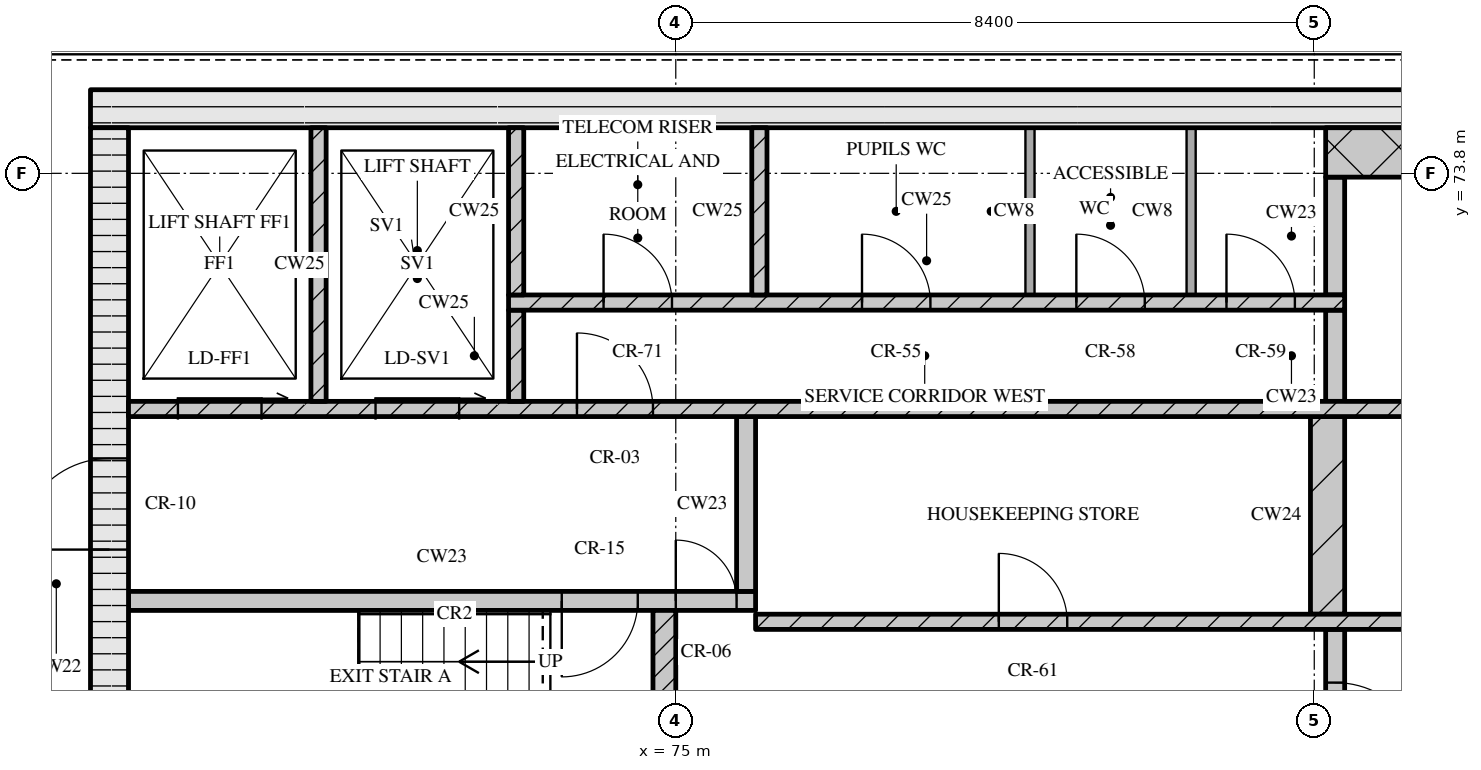
"""IFC4 building model, lengths in metres.
Left out: names, types, materials, properties, quantities, classifications, styles, units other than length and angle.
Written with IfcOpenShell. Run it as: python <this file> out.ifc"""

import sys

from ifc_helpers import new_model, si_unit, direction, frame, frame_2d, origin, place, context, subcontext, project, spatial, rectangle, extrude, element, fill, save


model = new_model("IFC4")
c1 = context("Model", 3, precision=1e-05, world=origin(), true_north=direction((0.0, 1.0)))
c2 = subcontext(c1, "Body", "Model", "MODEL_VIEW")
j1 = project(units=[si_unit("LENGTHUNIT", "METRE"), si_unit("PLANEANGLEUNIT", "RADIAN")], contexts=[c1])
p1 = place(None, origin())
s1 = spatial("IfcSite", under=j1, at=p1, CompositionType="ELEMENT")
p2 = place(p1, origin())
s2 = spatial("IfcBuilding", under=s1, at=p2, CompositionType="ELEMENT")
p3 = place(p2, frame((0.0, 0.0, 270.75)))
s3 = spatial("IfcBuildingStorey", under=s2, at=p3, CompositionType="ELEMENT", Elevation=270.75)
p4 = place(p3, frame((67.3, 74.65, 0.0), z_axis=(0.0, 0.0, 1.0), x_axis=(1.0, 0.0, 0.0)))
e1 = element("IfcWall", 1, at=p4, inside=s3, PredefinedType="SOLIDWALL", context=c2, shape_type="SweptSolid", body=[
    extrude(rectangle(XDim=40.6, YDim=0.5, at=frame_2d((20.3, 0.0))), origin(), (0.0, 0.0, 1.0), 3.32),
])
p5 = place(p3, frame((67.55, 62.4, 0.0), z_axis=(0.0, 0.0, 1.0), x_axis=(0.0, 1.0, 0.0)))
e2 = element("IfcWall", 2, at=p5, inside=s3, PredefinedType="SOLIDWALL", context=c2, shape_type="SweptSolid", body=[
    extrude(rectangle(XDim=12.0, YDim=0.5, at=frame_2d((6.0, 0.0))), origin(), (0.0, 0.0, 1.0), 3.32),
])
p6 = place(p5, frame((6.45, 0.0, 0.0)))
e3 = element("IfcOpeningElement", 3, at=p6, cuts=e2, PredefinedType="OPENING", context=c2, shape_type="SweptSolid", body=[
    extrude(rectangle(XDim=1.2, YDim=2.1, at=frame_2d((0.6, 1.05))), frame((0.0, 0.26, 0.0), z_axis=(0.0, -1.0, 0.0), x_axis=(1.0, 0.0, 0.0)), (0.0, 0.0, 1.0), 0.52),
])
p7 = place(p3, frame((74.85, 65.2, 0.0), z_axis=(0.0, 0.0, 1.0), x_axis=(0.0, 1.0, 0.0)))
e4 = element("IfcWall", 4, at=p7, inside=s3, PredefinedType="SOLIDWALL", context=c2, shape_type="SweptSolid", body=[
    extrude(rectangle(XDim=2.85, YDim=0.3, at=frame_2d((1.425, 0.0))), origin(), (0.0, 0.0, 1.0), 3.32),
])
p8 = place(p3, frame((83.675, 65.2, 0.0), z_axis=(0.0, 0.0, 1.0), x_axis=(0.0, 1.0, 0.0)))
e5 = element("IfcWall", 5, at=p8, inside=s3, PredefinedType="SOLIDWALL", context=c2, shape_type="SweptSolid", body=[
    extrude(rectangle(XDim=2.6, YDim=0.25, at=frame_2d((1.3, 0.0))), origin(), (0.0, 0.0, 1.0), 3.32),
])
p9 = place(p8, frame((0.7, 0.0, 0.0)))
e6 = element("IfcOpeningElement", 6, at=p9, cuts=e5, PredefinedType="OPENING", context=c2, shape_type="SweptSolid", body=[
    extrude(rectangle(XDim=1.2, YDim=2.1, at=frame_2d((0.6, 1.05))), frame((0.0, 0.135, 0.0), z_axis=(0.0, -1.0, 0.0), x_axis=(1.0, 0.0, 0.0)), (0.0, 0.0, 1.0), 0.27),
])
p10 = place(p3, frame((76.05, 67.9, 0.0), z_axis=(0.0, 0.0, 1.0), x_axis=(1.0, 0.0, 0.0)))
e7 = element("IfcWall", 7, at=p10, inside=s3, PredefinedType="SOLIDWALL", context=c2, shape_type="SweptSolid", body=[
    extrude(rectangle(XDim=23.1, YDim=0.2, at=frame_2d((11.55, 0.0))), origin(), (0.0, 0.0, 1.0), 3.32),
])
p11 = place(p10, frame((3.2, 0.0, 0.0)))
e8 = element("IfcOpeningElement", 8, at=p11, cuts=e7, PredefinedType="OPENING", context=c2, shape_type="SweptSolid", body=[
    extrude(rectangle(XDim=0.9, YDim=2.1, at=frame_2d((0.45, 1.05))), frame((0.0, 0.11, 0.0), z_axis=(0.0, -1.0, 0.0), x_axis=(1.0, 0.0, 0.0)), (0.0, 0.0, 1.0), 0.22),
])
p12 = place(p10, frame((9.7, 0.0, 0.0)))
e9 = element("IfcOpeningElement", 9, at=p12, cuts=e7, PredefinedType="OPENING", context=c2, shape_type="SweptSolid", body=[
    extrude(rectangle(XDim=0.9, YDim=2.1, at=frame_2d((0.45, 1.05))), frame((0.0, 0.11, 0.0), z_axis=(0.0, -1.0, 0.0), x_axis=(1.0, 0.0, 0.0)), (0.0, 0.0, 1.0), 0.22),
])
p13 = place(p10, frame((13.55, 0.0, 0.0)))
e10 = element("IfcOpeningElement", 10, at=p13, cuts=e7, PredefinedType="OPENING", context=c2, shape_type="SweptSolid", body=[
    extrude(rectangle(XDim=1.0, YDim=2.1, at=frame_2d((0.5, 1.05))), frame((0.0, 0.11, 0.0), z_axis=(0.0, -1.0, 0.0), x_axis=(1.0, 0.0, 0.0)), (0.0, 0.0, 1.0), 0.22),
])
p14 = place(p10, frame((16.2, 0.0, 0.0)))
e11 = element("IfcOpeningElement", 11, at=p14, cuts=e7, PredefinedType="OPENING", context=c2, shape_type="SweptSolid", body=[
    extrude(rectangle(XDim=1.1, YDim=2.1, at=frame_2d((0.55, 1.05))), frame((0.0, 0.11, 0.0), z_axis=(0.0, -1.0, 0.0), x_axis=(1.0, 0.0, 0.0)), (0.0, 0.0, 1.0), 0.22),
])
p15 = place(p10, frame((18.7, 0.0, 0.0)))
e12 = element("IfcOpeningElement", 12, at=p15, cuts=e7, PredefinedType="OPENING", context=c2, shape_type="SweptSolid", body=[
    extrude(rectangle(XDim=1.1, YDim=2.1, at=frame_2d((0.55, 1.05))), frame((0.0, 0.11, 0.0), z_axis=(0.0, -1.0, 0.0), x_axis=(1.0, 0.0, 0.0)), (0.0, 0.0, 1.0), 0.22),
])
p16 = place(p10, frame((21.2, 0.0, 0.0)))
e13 = element("IfcOpeningElement", 13, at=p16, cuts=e7, PredefinedType="OPENING", context=c2, shape_type="SweptSolid", body=[
    extrude(rectangle(XDim=1.1, YDim=2.1, at=frame_2d((0.55, 1.05))), frame((0.0, 0.11, 0.0), z_axis=(0.0, -1.0, 0.0), x_axis=(1.0, 0.0, 0.0)), (0.0, 0.0, 1.0), 0.22),
])
p17 = place(p3, frame((83.575, 68.0, 0.0), z_axis=(0.0, 0.0, 1.0), x_axis=(0.0, 1.0, 0.0)))
e14 = element("IfcWall", 14, at=p17, inside=s3, PredefinedType="SOLIDWALL", context=c2, shape_type="SweptSolid", body=[
    extrude(rectangle(XDim=2.6, YDim=0.45, at=frame_2d((1.3, 0.0))), origin(), (0.0, 0.0, 1.0), 3.32),
])
p18 = place(p3, frame((67.8, 68.175, 0.0), z_axis=(0.0, 0.0, 1.0), x_axis=(1.0, 0.0, 0.0)))
e15 = element("IfcWall", 15, at=p18, inside=s3, PredefinedType="SOLIDWALL", context=c2, shape_type="SweptSolid", body=[
    extrude(rectangle(XDim=8.25, YDim=0.25, at=frame_2d((4.125, 0.0))), origin(), (0.0, 0.0, 1.0), 3.32),
])
p19 = place(p18, frame((5.7, 0.0, 0.0)))
e16 = element("IfcOpeningElement", 16, at=p19, cuts=e15, PredefinedType="OPENING", context=c2, shape_type="SweptSolid", body=[
    extrude(rectangle(XDim=1.0, YDim=2.1, at=frame_2d((0.5, 1.05))), frame((0.0, 0.135, 0.0), z_axis=(0.0, -1.0, 0.0), x_axis=(1.0, 0.0, 0.0)), (0.0, 0.0, 1.0), 0.27),
])
p20 = place(p18, frame((7.2, 0.0, 0.0)))
e17 = element("IfcOpeningElement", 17, at=p20, cuts=e15, PredefinedType="OPENING", context=c2, shape_type="SweptSolid", body=[
    extrude(rectangle(XDim=0.8, YDim=2.1, at=frame_2d((0.4, 1.05))), frame((0.0, 0.135, 0.0), z_axis=(0.0, -1.0, 0.0), x_axis=(1.0, 0.0, 0.0)), (0.0, 0.0, 1.0), 0.27),
])
p21 = place(p3, frame((75.925, 68.3, 0.0), z_axis=(0.0, 0.0, 1.0), x_axis=(0.0, 1.0, 0.0)))
e18 = element("IfcWall", 18, at=p21, inside=s3, PredefinedType="SOLIDWALL", context=c2, shape_type="SweptSolid", body=[
    extrude(rectangle(XDim=2.3, YDim=0.25, at=frame_2d((1.15, 0.0))), origin(), (0.0, 0.0, 1.0), 3.32),
])
p22 = place(p3, frame((67.8, 70.7, 0.0), z_axis=(0.0, 0.0, 1.0), x_axis=(1.0, 0.0, 0.0)))
e19 = element("IfcWall", 19, at=p22, inside=s3, PredefinedType="SOLIDWALL", context=c2, shape_type="SweptSolid", body=[
    extrude(rectangle(XDim=39.6, YDim=0.2, at=frame_2d((19.8, 0.0))), origin(), (0.0, 0.0, 1.0), 3.32),
])
p23 = place(p22, frame((0.65, 0.0, 0.0)))
e20 = element("IfcOpeningElement", 20, at=p23, cuts=e19, PredefinedType="OPENING", context=c2, shape_type="SweptSolid", body=[
    extrude(rectangle(XDim=1.1, YDim=2.1, at=frame_2d((0.55, 1.05))), frame((0.0, 0.11, 0.0), z_axis=(0.0, -1.0, 0.0), x_axis=(1.0, 0.0, 0.0)), (0.0, 0.0, 1.0), 0.22),
])
p24 = place(p22, frame((3.25, 0.0, 0.0)))
e21 = element("IfcOpeningElement", 21, at=p24, cuts=e19, PredefinedType="OPENING", context=c2, shape_type="SweptSolid", body=[
    extrude(rectangle(XDim=1.1, YDim=2.1, at=frame_2d((0.55, 1.05))), frame((0.0, 0.11, 0.0), z_axis=(0.0, -1.0, 0.0), x_axis=(1.0, 0.0, 0.0)), (0.0, 0.0, 1.0), 0.22),
])
p25 = place(p22, frame((5.9, 0.0, 0.0)))
e22 = element("IfcOpeningElement", 22, at=p25, cuts=e19, PredefinedType="OPENING", context=c2, shape_type="SweptSolid", body=[
    extrude(rectangle(XDim=1.0, YDim=2.1, at=frame_2d((0.5, 1.05))), frame((0.0, 0.11, 0.0), z_axis=(0.0, -1.0, 0.0), x_axis=(1.0, 0.0, 0.0)), (0.0, 0.0, 1.0), 0.22),
])
p26 = place(p22, frame((21.7, 0.0, 0.0)))
e23 = element("IfcOpeningElement", 23, at=p26, cuts=e19, PredefinedType="OPENING", context=c2, shape_type="SweptSolid", body=[
    extrude(rectangle(XDim=1.0, YDim=2.1, at=frame_2d((0.5, 1.05))), frame((0.0, 0.11, 0.0), z_axis=(0.0, -1.0, 0.0), x_axis=(1.0, 0.0, 0.0)), (0.0, 0.0, 1.0), 0.22),
])
p27 = place(p22, frame((32.7, 0.0, 0.0)))
e24 = element("IfcOpeningElement", 24, at=p27, cuts=e19, PredefinedType="OPENING", context=c2, shape_type="SweptSolid", body=[
    extrude(rectangle(XDim=1.0, YDim=2.1, at=frame_2d((0.5, 1.05))), frame((0.0, 0.11, 0.0), z_axis=(0.0, -1.0, 0.0), x_axis=(1.0, 0.0, 0.0)), (0.0, 0.0, 1.0), 0.22),
])
p28 = place(p22, frame((35.25, 0.0, 0.0)))
e25 = element("IfcOpeningElement", 25, at=p28, cuts=e19, PredefinedType="OPENING", context=c2, shape_type="SweptSolid", body=[
    extrude(rectangle(XDim=1.1, YDim=2.1, at=frame_2d((0.55, 1.05))), frame((0.0, 0.11, 0.0), z_axis=(0.0, -1.0, 0.0), x_axis=(1.0, 0.0, 0.0)), (0.0, 0.0, 1.0), 0.22),
])
p29 = place(p22, frame((37.85, 0.0, 0.0)))
e26 = element("IfcOpeningElement", 26, at=p29, cuts=e19, PredefinedType="OPENING", context=c2, shape_type="SweptSolid", body=[
    extrude(rectangle(XDim=1.1, YDim=2.1, at=frame_2d((0.55, 1.05))), frame((0.0, 0.11, 0.0), z_axis=(0.0, -1.0, 0.0), x_axis=(1.0, 0.0, 0.0)), (0.0, 0.0, 1.0), 0.22),
])
p30 = place(p3, frame((70.3, 70.8, 0.0), z_axis=(0.0, 0.0, 1.0), x_axis=(0.0, 1.0, 0.0)))
e27 = element("IfcWall", 27, at=p30, inside=s3, PredefinedType="SOLIDWALL", context=c2, shape_type="SweptSolid", body=[
    extrude(rectangle(XDim=3.6, YDim=0.2, at=frame_2d((1.8, 0.0))), origin(), (0.0, 0.0, 1.0), 3.32),
])
p31 = place(p3, frame((72.9, 70.8, 0.0), z_axis=(0.0, 0.0, 1.0), x_axis=(0.0, 1.0, 0.0)))
e28 = element("IfcWall", 28, at=p31, inside=s3, PredefinedType="SOLIDWALL", context=c2, shape_type="SweptSolid", body=[
    extrude(rectangle(XDim=1.2, YDim=0.2, at=frame_2d((0.6, 0.0))), origin(), (0.0, 0.0, 1.0), 3.32),
])
p32 = place(p3, frame((83.675, 70.8, 0.0), z_axis=(0.0, 0.0, 1.0), x_axis=(0.0, 1.0, 0.0)))
e29 = element("IfcWall", 29, at=p32, inside=s3, PredefinedType="SOLIDWALL", context=c2, shape_type="SweptSolid", body=[
    extrude(rectangle(XDim=1.2, YDim=0.25, at=frame_2d((0.6, 0.0))), origin(), (0.0, 0.0, 1.0), 3.32),
])
p33 = place(p3, frame((72.8, 72.1, 0.0), z_axis=(0.0, 0.0, 1.0), x_axis=(1.0, 0.0, 0.0)))
e30 = element("IfcWall", 30, at=p33, inside=s3, PredefinedType="SOLIDWALL", context=c2, shape_type="SweptSolid", body=[
    extrude(rectangle(XDim=11.0, YDim=0.2, at=frame_2d((5.5, 0.0))), origin(), (0.0, 0.0, 1.0), 3.32),
])
p34 = place(p33, frame((1.25, 0.0, 0.0)))
e31 = element("IfcOpeningElement", 31, at=p34, cuts=e30, PredefinedType="OPENING", context=c2, shape_type="SweptSolid", body=[
    extrude(rectangle(XDim=0.9, YDim=2.1, at=frame_2d((0.45, 1.05))), frame((0.0, 0.11, 0.0), z_axis=(0.0, -1.0, 0.0), x_axis=(1.0, 0.0, 0.0)), (0.0, 0.0, 1.0), 0.22),
])
p35 = place(p33, frame((4.65, 0.0, 0.0)))
e32 = element("IfcOpeningElement", 32, at=p35, cuts=e30, PredefinedType="OPENING", context=c2, shape_type="SweptSolid", body=[
    extrude(rectangle(XDim=0.9, YDim=2.1, at=frame_2d((0.45, 1.05))), frame((0.0, 0.11, 0.0), z_axis=(0.0, -1.0, 0.0), x_axis=(1.0, 0.0, 0.0)), (0.0, 0.0, 1.0), 0.22),
])
p36 = place(p33, frame((7.47, 0.0, 0.0)))
e33 = element("IfcOpeningElement", 33, at=p36, cuts=e30, PredefinedType="OPENING", context=c2, shape_type="SweptSolid", body=[
    extrude(rectangle(XDim=0.9, YDim=2.1, at=frame_2d((0.45, 1.05))), frame((0.0, 0.11, 0.0), z_axis=(0.0, -1.0, 0.0), x_axis=(1.0, 0.0, 0.0)), (0.0, 0.0, 1.0), 0.22),
])
p37 = place(p33, frame((9.445, 0.0, 0.0)))
e34 = element("IfcOpeningElement", 34, at=p37, cuts=e30, PredefinedType="OPENING", context=c2, shape_type="SweptSolid", body=[
    extrude(rectangle(XDim=0.9, YDim=2.1, at=frame_2d((0.45, 1.05))), frame((0.0, 0.11, 0.0), z_axis=(0.0, -1.0, 0.0), x_axis=(1.0, 0.0, 0.0)), (0.0, 0.0, 1.0), 0.22),
])
for number, where, z_axis, x_axis in (
    (35, (72.9, 72.2, 0.0), (0.0, 0.0, 1.0), (0.0, 1.0, 0.0)),
    (36, (76.1, 72.2, 0.0), (0.0, 0.0, 1.0), (0.0, 1.0, 0.0)),
):
    element("IfcWall", number, at=place(p3, frame(where, z_axis=z_axis, x_axis=x_axis)), inside=s3, PredefinedType="SOLIDWALL", context=c2, shape_type="SweptSolid", body=[
        extrude(rectangle(XDim=2.2, YDim=0.2, at=frame_2d((1.1, 0.0))), origin(), (0.0, 0.0, 1.0), 3.32),
    ])
for number, where, z_axis, x_axis in (
    (37, (79.66, 72.2, 0.0), (0.0, 0.0, 1.0), (0.0, 1.0, 0.0)),
    (38, (81.78, 72.2, 0.0), (0.0, 0.0, 1.0), (0.0, 1.0, 0.0)),
):
    element("IfcWall", number, at=place(p3, frame(where, z_axis=z_axis, x_axis=x_axis)), inside=s3, PredefinedType="PARTITIONING", context=c2, shape_type="SweptSolid", body=[
        extrude(rectangle(XDim=2.2, YDim=0.12, at=frame_2d((1.1, 0.0))), origin(), (0.0, 0.0, 1.0), 3.32),
    ])
p38 = place(p3, frame((83.675, 72.2, 0.0), z_axis=(0.0, 0.0, 1.0), x_axis=(0.0, 1.0, 0.0)))
e39 = element("IfcWall", 39, at=p38, inside=s3, PredefinedType="SOLIDWALL", context=c2, shape_type="SweptSolid", body=[
    extrude(rectangle(XDim=1.55, YDim=0.25, at=frame_2d((0.775, 0.0))), origin(), (0.0, 0.0, 1.0), 3.32),
])
p39 = place(p3, frame((83.55, 74.075, 0.0), z_axis=(0.0, 0.0, 1.0), x_axis=(1.0, 0.0, 0.0)))
e40 = element("IfcWall", 40, at=p39, inside=s3, PredefinedType="SOLIDWALL", context=c2, shape_type="SweptSolid", body=[
    extrude(rectangle(XDim=8.1, YDim=0.65, at=frame_2d((4.05, 0.0))), origin(), (0.0, 0.0, 1.0), 3.32),
])
p40 = place(p9, origin())
e41 = element("IfcDoor", 41, at=p40, inside=s3, OperationType="SINGLE_SWING_RIGHT", PredefinedType="DOOR", context=c2, shape_type="SweptSolid", body=[
    extrude(rectangle(XDim=1.2, YDim=2.1, at=frame_2d((0.6, 1.05))), frame((0.0, 0.025, 0.0), z_axis=(0.0, -1.0, 0.0), x_axis=(1.0, 0.0, 0.0)), (0.0, 0.0, 1.0), 0.05),
])
fill(e6, e41)
p41 = place(p11, origin())
e42 = element("IfcDoor", 42, at=p41, inside=s3, OperationType="SINGLE_SWING_LEFT", PredefinedType="DOOR", context=c2, shape_type="SweptSolid", body=[
    extrude(rectangle(XDim=0.9, YDim=2.1, at=frame_2d((0.45, 1.05))), frame((0.0, 0.025, 0.0), z_axis=(0.0, -1.0, 0.0), x_axis=(1.0, 0.0, 0.0)), (0.0, 0.0, 1.0), 0.05),
])
fill(e8, e42)
p42 = place(p19, origin())
e43 = element("IfcDoor", 43, at=p42, inside=s3, OperationType="SINGLE_SWING_RIGHT", PredefinedType="DOOR", context=c2, shape_type="SweptSolid", body=[
    extrude(rectangle(XDim=1.0, YDim=2.1, at=frame_2d((0.5, 1.05))), frame((0.0, 0.025, 0.0), z_axis=(0.0, -1.0, 0.0), x_axis=(1.0, 0.0, 0.0)), (0.0, 0.0, 1.0), 0.05),
])
fill(e16, e43)
p43 = place(p20, origin())
e44 = element("IfcDoor", 44, at=p43, inside=s3, OperationType="SINGLE_SWING_LEFT", PredefinedType="DOOR", context=c2, shape_type="SweptSolid", body=[
    extrude(rectangle(XDim=0.8, YDim=2.1, at=frame_2d((0.4, 1.05))), frame((0.0, 0.025, 0.0), z_axis=(0.0, -1.0, 0.0), x_axis=(1.0, 0.0, 0.0)), (0.0, 0.0, 1.0), 0.05),
])
fill(e17, e44)
p44 = place(p6, origin())
e45 = element("IfcDoor", 45, at=p44, inside=s3, OperationType="SINGLE_SWING_LEFT", PredefinedType="DOOR", context=c2, shape_type="SweptSolid", body=[
    extrude(rectangle(XDim=1.2, YDim=2.1, at=frame_2d((0.6, 1.05))), frame((0.0, 0.025, 0.0), z_axis=(0.0, -1.0, 0.0), x_axis=(1.0, 0.0, 0.0)), (0.0, 0.0, 1.0), 0.05),
])
fill(e3, e45)
p45 = place(p23, origin())
e46 = element("IfcDoor", 46, at=p45, inside=s3, OperationType="SLIDING_TO_RIGHT", PredefinedType="DOOR", context=c2, shape_type="SweptSolid", body=[
    extrude(rectangle(XDim=1.1, YDim=2.1, at=frame_2d((0.55, 1.05))), frame((0.0, 0.025, 0.0), z_axis=(0.0, -1.0, 0.0), x_axis=(1.0, 0.0, 0.0)), (0.0, 0.0, 1.0), 0.05),
])
fill(e20, e46)
p46 = place(p24, origin())
e47 = element("IfcDoor", 47, at=p46, inside=s3, OperationType="SLIDING_TO_RIGHT", PredefinedType="DOOR", context=c2, shape_type="SweptSolid", body=[
    extrude(rectangle(XDim=1.1, YDim=2.1, at=frame_2d((0.55, 1.05))), frame((0.0, 0.025, 0.0), z_axis=(0.0, -1.0, 0.0), x_axis=(1.0, 0.0, 0.0)), (0.0, 0.0, 1.0), 0.05),
])
fill(e21, e47)
p47 = place(p25, origin())
e48 = element("IfcDoor", 48, at=p47, inside=s3, OperationType="SINGLE_SWING_LEFT", PredefinedType="DOOR", context=c2, shape_type="SweptSolid", body=[
    extrude(rectangle(XDim=1.0, YDim=2.1, at=frame_2d((0.5, 1.05))), frame((0.0, 0.025, 0.0), z_axis=(0.0, -1.0, 0.0), x_axis=(1.0, 0.0, 0.0)), (0.0, 0.0, 1.0), 0.05),
])
fill(e22, e48)
p48 = place(p34, origin())
e49 = element("IfcDoor", 49, at=p48, inside=s3, OperationType="SINGLE_SWING_LEFT", PredefinedType="DOOR", context=c2, shape_type="SweptSolid", body=[
    extrude(rectangle(XDim=0.9, YDim=2.1, at=frame_2d((0.45, 1.05))), frame((0.0, 0.025, 0.0), z_axis=(0.0, -1.0, 0.0), x_axis=(1.0, 0.0, 0.0)), (0.0, 0.0, 1.0), 0.05),
])
fill(e31, e49)
p49 = place(p35, origin())
e50 = element("IfcDoor", 50, at=p49, inside=s3, OperationType="SINGLE_SWING_LEFT", PredefinedType="DOOR", context=c2, shape_type="SweptSolid", body=[
    extrude(rectangle(XDim=0.9, YDim=2.1, at=frame_2d((0.45, 1.05))), frame((0.0, 0.025, 0.0), z_axis=(0.0, -1.0, 0.0), x_axis=(1.0, 0.0, 0.0)), (0.0, 0.0, 1.0), 0.05),
])
fill(e32, e50)
p50 = place(p36, origin())
e51 = element("IfcDoor", 51, at=p50, inside=s3, OperationType="SINGLE_SWING_LEFT", PredefinedType="DOOR", context=c2, shape_type="SweptSolid", body=[
    extrude(rectangle(XDim=0.9, YDim=2.1, at=frame_2d((0.45, 1.05))), frame((0.0, 0.025, 0.0), z_axis=(0.0, -1.0, 0.0), x_axis=(1.0, 0.0, 0.0)), (0.0, 0.0, 1.0), 0.05),
])
fill(e33, e51)
p51 = place(p37, origin())
e52 = element("IfcDoor", 52, at=p51, inside=s3, OperationType="SINGLE_SWING_LEFT", PredefinedType="DOOR", context=c2, shape_type="SweptSolid", body=[
    extrude(rectangle(XDim=0.9, YDim=2.1, at=frame_2d((0.45, 1.05))), frame((0.0, 0.025, 0.0), z_axis=(0.0, -1.0, 0.0), x_axis=(1.0, 0.0, 0.0)), (0.0, 0.0, 1.0), 0.05),
])
fill(e34, e52)
save(model, sys.argv[1])
